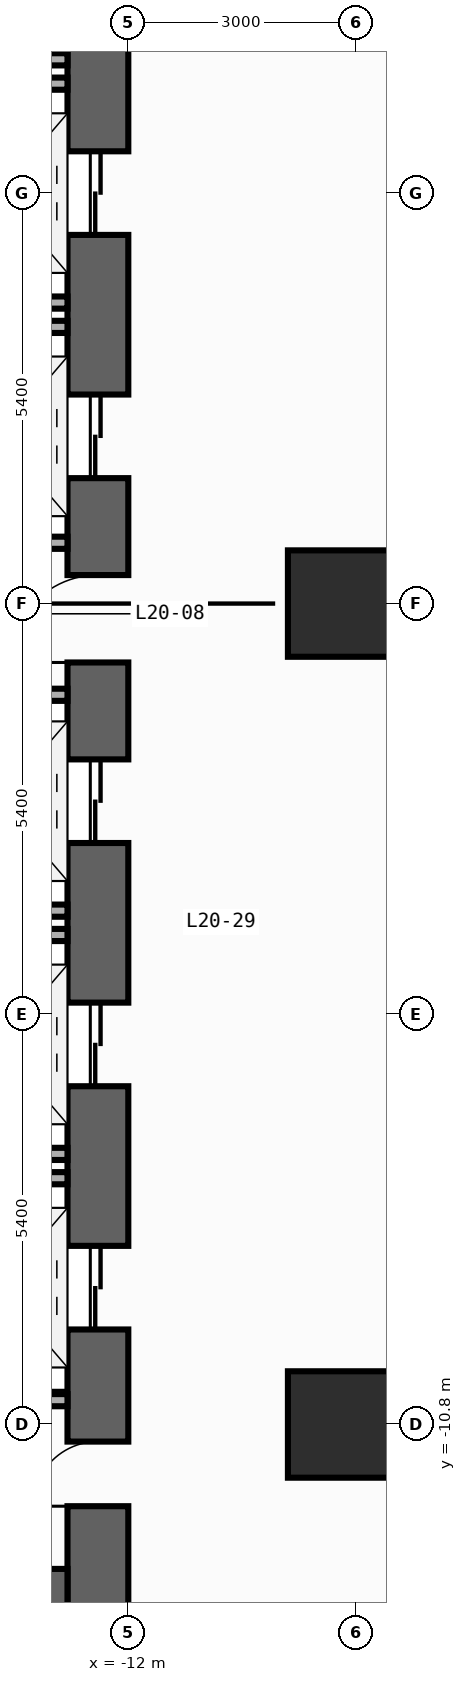
"""IFC4 building model, lengths in metres.
Left out: names, types, materials, properties, quantities, classifications, styles, units other than length and angle.
Written with IfcOpenShell. Run it as: python <this file> out.ifc"""

import sys

from ifc_helpers import new_model, si_unit, direction, frame, frame_2d, origin, origin_2d, place, context, subcontext, project, spatial, rectangle, extrude, element, fill, save


model = new_model("IFC4")
c1 = context("Model", 3, precision=1e-05, world=origin(), true_north=direction((0.0, 1.0)))
c2 = subcontext(c1, "Body", "Model", "MODEL_VIEW")
j1 = project(units=[si_unit("LENGTHUNIT", "METRE"), si_unit("PLANEANGLEUNIT", "RADIAN")], contexts=[c1])
p1 = place(None, origin())
s1 = spatial("IfcSite", under=j1, at=p1, CompositionType="ELEMENT")
p2 = place(p1, origin())
s2 = spatial("IfcBuilding", under=s1, at=p2, CompositionType="ELEMENT")
p3 = place(p2, frame((0.0, 0.0, 84.8)))
s3 = spatial("IfcBuildingStorey", under=s2, at=p3, CompositionType="ELEMENT", Elevation=84.8)
p4 = place(p3, frame((-12.4, -13.5, 0.0), z_axis=(0.0, 0.0, 1.0), x_axis=(0.0, 1.0, 0.0)))
e1 = element("IfcWall", 1, at=p4, inside=s3, PredefinedType="SHEAR", context=c2, shape_type="SweptSolid", body=[
    extrude(rectangle(XDim=27.0, YDim=0.8, at=frame_2d((13.5, 0.0))), origin(), (0.0, 0.0, 1.0), 8.14),
])
p5 = place(p4, frame((21.55, 0.0, 0.0)))
e2 = element("IfcOpeningElement", 2, at=p5, cuts=e1, PredefinedType="OPENING", context=c2, shape_type="SweptSolid", body=[
    extrude(rectangle(XDim=1.1, YDim=2.2, at=frame_2d((0.55, 1.1))), frame((0.0, 0.41, 0.0), z_axis=(0.0, -1.0, 0.0), x_axis=(1.0, 0.0, 0.0)), (0.0, 0.0, 1.0), 0.82),
])
p6 = place(p4, frame((18.35, 0.0, 0.0)))
e3 = element("IfcOpeningElement", 3, at=p6, cuts=e1, PredefinedType="OPENING", context=c2, shape_type="SweptSolid", body=[
    extrude(rectangle(XDim=1.1, YDim=2.2, at=frame_2d((0.55, 1.1))), frame((0.0, 0.41, 0.0), z_axis=(0.0, -1.0, 0.0), x_axis=(1.0, 0.0, 0.0)), (0.0, 0.0, 1.0), 0.82),
])
p7 = place(p4, frame((15.15, 0.0, 0.0)))
e4 = element("IfcOpeningElement", 4, at=p7, cuts=e1, PredefinedType="OPENING", context=c2, shape_type="SweptSolid", body=[
    extrude(rectangle(XDim=1.1, YDim=2.2, at=frame_2d((0.55, 1.1))), frame((0.0, 0.41, 0.0), z_axis=(0.0, -1.0, 0.0), x_axis=(1.0, 0.0, 0.0)), (0.0, 0.0, 1.0), 0.82),
])
p8 = place(p4, frame((10.35, 0.0, 0.0)))
e5 = element("IfcOpeningElement", 5, at=p8, cuts=e1, PredefinedType="OPENING", context=c2, shape_type="SweptSolid", body=[
    extrude(rectangle(XDim=1.1, YDim=2.2, at=frame_2d((0.55, 1.1))), frame((0.0, 0.41, 0.0), z_axis=(0.0, -1.0, 0.0), x_axis=(1.0, 0.0, 0.0)), (0.0, 0.0, 1.0), 0.82),
])
p9 = place(p4, frame((7.15, 0.0, 0.0)))
e6 = element("IfcOpeningElement", 6, at=p9, cuts=e1, PredefinedType="OPENING", context=c2, shape_type="SweptSolid", body=[
    extrude(rectangle(XDim=1.1, YDim=2.2, at=frame_2d((0.55, 1.1))), frame((0.0, 0.41, 0.0), z_axis=(0.0, -1.0, 0.0), x_axis=(1.0, 0.0, 0.0)), (0.0, 0.0, 1.0), 0.82),
])
p10 = place(p4, frame((3.95, 0.0, 0.0)))
e7 = element("IfcOpeningElement", 7, at=p10, cuts=e1, PredefinedType="OPENING", context=c2, shape_type="SweptSolid", body=[
    extrude(rectangle(XDim=1.1, YDim=2.2, at=frame_2d((0.55, 1.1))), frame((0.0, 0.41, 0.0), z_axis=(0.0, -1.0, 0.0), x_axis=(1.0, 0.0, 0.0)), (0.0, 0.0, 1.0), 0.82),
])
p11 = place(p4, frame((12.725, 0.0, 0.0)))
e8 = element("IfcOpeningElement", 8, at=p11, cuts=e1, PredefinedType="OPENING", context=c2, shape_type="SweptSolid", body=[
    extrude(rectangle(XDim=1.15, YDim=2.2, at=frame_2d((0.575, 1.1))), frame((0.0, 0.41, 0.0), z_axis=(0.0, -1.0, 0.0), x_axis=(1.0, 0.0, 0.0)), (0.0, 0.0, 1.0), 0.82),
])
p12 = place(p4, frame((1.625, 0.0, 0.0)))
e9 = element("IfcOpeningElement", 9, at=p12, cuts=e1, PredefinedType="OPENING", context=c2, shape_type="SweptSolid", body=[
    extrude(rectangle(XDim=0.85, YDim=2.1, at=frame_2d((0.425, 1.05))), frame((0.0, 0.41, 0.0), z_axis=(0.0, -1.0, 0.0), x_axis=(1.0, 0.0, 0.0)), (0.0, 0.0, 1.0), 0.82),
])
p13 = place(p3, frame((-19.6, -13.1, 0.0), z_axis=(0.0, 0.0, 1.0), x_axis=(1.0, 0.0, 0.0)))
e10 = element("IfcWall", 10, at=p13, inside=s3, PredefinedType="SHEAR", context=c2, shape_type="SweptSolid", body=[
    extrude(rectangle(XDim=6.8, YDim=0.8, at=frame_2d((3.4, 0.0))), origin(), (0.0, 0.0, 1.0), 8.14),
])
for number, where, z_axis, x_axis in (
    (11, (-9.2, -10.8, 0.0), (0.0, 0.0, 1.0), (1.0, 0.0, 0.0)),
    (12, (-9.2, 0.0, 0.0), (0.0, 0.0, 1.0), (1.0, 0.0, 0.0)),
):
    element("IfcColumn", number, at=place(p3, frame(where, z_axis=z_axis, x_axis=x_axis)), inside=s3, PredefinedType="COLUMN", context=c2, shape_type="SweptSolid", body=[
        extrude(rectangle(XDim=1.4, YDim=1.4, at=origin_2d()), origin(), (0.0, 0.0, 1.0), 8.4),
    ])
for number, where, z_axis, x_axis in (
    (13, (-14.99, 7.16, 0.0), (0.0, 0.0, 1.0), (1.0, 0.0, 0.0)),
    (14, (-14.99, 3.96, 0.0), (0.0, 0.0, 1.0), (1.0, 0.0, 0.0)),
    (15, (-14.99, 6.84, 0.0), (0.0, 0.0, 1.0), (1.0, 0.0, 0.0)),
    (16, (-14.99, 3.64, 0.0), (0.0, 0.0, 1.0), (1.0, 0.0, 0.0)),
    (17, (-14.99, -4.04, 0.0), (0.0, 0.0, 1.0), (1.0, 0.0, 0.0)),
    (18, (-14.99, -7.24, 0.0), (0.0, 0.0, 1.0), (1.0, 0.0, 0.0)),
    (19, (-14.99, -4.36, 0.0), (0.0, 0.0, 1.0), (1.0, 0.0, 0.0)),
    (20, (-14.99, -7.56, 0.0), (0.0, 0.0, 1.0), (1.0, 0.0, 0.0)),
):
    element("IfcWall", number, at=place(p3, frame(where, z_axis=z_axis, x_axis=x_axis)), inside=s3, PredefinedType="STANDARD", context=c2, shape_type="SweptSolid", body=[
        extrude(rectangle(XDim=2.19, YDim=0.16, at=frame_2d((1.095, 0.0))), origin(), (0.0, 0.0, 1.0), 8.14),
    ])
for number, where, z_axis, x_axis in (
    (21, (-15.4, 0.8, 0.0), (0.0, 0.0, 1.0), (1.0, 0.0, 0.0)),
    (22, (-15.4, -1.2, 0.0), (0.0, 0.0, 1.0), (1.0, 0.0, 0.0)),
    (23, (-15.4, -10.48, 0.0), (0.0, 0.0, 1.0), (1.0, 0.0, 0.0)),
):
    element("IfcWall", number, at=place(p3, frame(where, z_axis=z_axis, x_axis=x_axis)), inside=s3, PredefinedType="STANDARD", context=c2, shape_type="SweptSolid", body=[
        extrude(rectangle(XDim=2.6, YDim=0.16, at=frame_2d((1.3, 0.0))), origin(), (0.0, 0.0, 1.0), 8.14),
    ])
p14 = place(p6, origin())
e24 = element("IfcDoor", 24, at=p14, inside=s3, OperationType="DOUBLE_DOOR_SLIDING", PredefinedType="DOOR", context=c2, shape_type="SweptSolid", body=[
    extrude(rectangle(XDim=1.1, YDim=2.2, at=frame_2d((0.55, 1.1))), frame((0.0, 0.025, 0.0), z_axis=(0.0, -1.0, 0.0), x_axis=(1.0, 0.0, 0.0)), (0.0, 0.0, 1.0), 0.05),
])
fill(e3, e24)
p15 = place(p7, origin())
e25 = element("IfcDoor", 25, at=p15, inside=s3, OperationType="DOUBLE_DOOR_SLIDING", PredefinedType="DOOR", context=c2, shape_type="SweptSolid", body=[
    extrude(rectangle(XDim=1.1, YDim=2.2, at=frame_2d((0.55, 1.1))), frame((0.0, 0.025, 0.0), z_axis=(0.0, -1.0, 0.0), x_axis=(1.0, 0.0, 0.0)), (0.0, 0.0, 1.0), 0.05),
])
fill(e4, e25)
p16 = place(p8, origin())
e26 = element("IfcDoor", 26, at=p16, inside=s3, OperationType="DOUBLE_DOOR_SLIDING", PredefinedType="DOOR", context=c2, shape_type="SweptSolid", body=[
    extrude(rectangle(XDim=1.1, YDim=2.2, at=frame_2d((0.55, 1.1))), frame((0.0, 0.025, 0.0), z_axis=(0.0, -1.0, 0.0), x_axis=(1.0, 0.0, 0.0)), (0.0, 0.0, 1.0), 0.05),
])
fill(e5, e26)
p17 = place(p9, origin())
e27 = element("IfcDoor", 27, at=p17, inside=s3, OperationType="DOUBLE_DOOR_SLIDING", PredefinedType="DOOR", context=c2, shape_type="SweptSolid", body=[
    extrude(rectangle(XDim=1.1, YDim=2.2, at=frame_2d((0.55, 1.1))), frame((0.0, 0.025, 0.0), z_axis=(0.0, -1.0, 0.0), x_axis=(1.0, 0.0, 0.0)), (0.0, 0.0, 1.0), 0.05),
])
fill(e6, e27)
p18 = place(p10, origin())
e28 = element("IfcDoor", 28, at=p18, inside=s3, OperationType="DOUBLE_DOOR_SLIDING", PredefinedType="DOOR", context=c2, shape_type="SweptSolid", body=[
    extrude(rectangle(XDim=1.1, YDim=2.2, at=frame_2d((0.55, 1.1))), frame((0.0, 0.025, 0.0), z_axis=(0.0, -1.0, 0.0), x_axis=(1.0, 0.0, 0.0)), (0.0, 0.0, 1.0), 0.05),
])
fill(e7, e28)
p19 = place(p11, origin())
e29 = element("IfcDoor", 29, at=p19, inside=s3, OperationType="SINGLE_SWING_LEFT", PredefinedType="DOOR", context=c2, shape_type="SweptSolid", body=[
    extrude(rectangle(XDim=1.15, YDim=2.2, at=frame_2d((0.575, 1.1))), frame((0.0, 0.025, 0.0), z_axis=(0.0, -1.0, 0.0), x_axis=(1.0, 0.0, 0.0)), (0.0, 0.0, 1.0), 0.05),
])
fill(e8, e29)
p20 = place(p12, origin())
e30 = element("IfcDoor", 30, at=p20, inside=s3, OperationType="SINGLE_SWING_LEFT", PredefinedType="DOOR", context=c2, shape_type="SweptSolid", body=[
    extrude(rectangle(XDim=0.85, YDim=2.1, at=frame_2d((0.425, 1.05))), frame((0.0, 0.025, 0.0), z_axis=(0.0, -1.0, 0.0), x_axis=(1.0, 0.0, 0.0)), (0.0, 0.0, 1.0), 0.05),
])
fill(e9, e30)
save(model, sys.argv[1])
